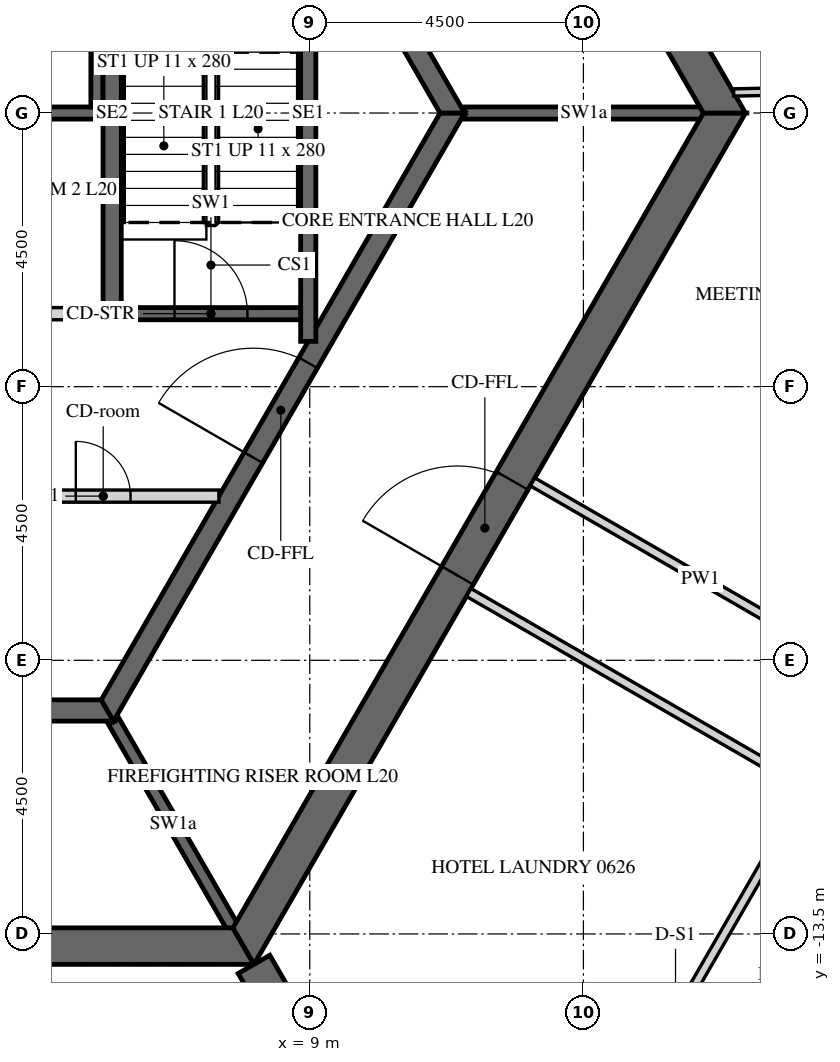
"""IFC4 building model, lengths in metres.
Left out: names, types, materials, properties, quantities, classifications, styles, units other than length and angle.
Written with IfcOpenShell. Run it as: python <this file> out.ifc"""

import sys

from ifc_helpers import new_model, si_unit, direction, frame, frame_2d, origin, place, context, subcontext, project, spatial, polyline, rectangle, outline, extrude, element, fill, save


model = new_model("IFC4")
c1 = context("Model", 3, precision=1e-05, world=origin(), true_north=direction((0.0, 1.0)))
c2 = subcontext(c1, "Body", "Model", "MODEL_VIEW")
j1 = project(units=[si_unit("LENGTHUNIT", "METRE"), si_unit("PLANEANGLEUNIT", "RADIAN")], contexts=[c1])
p1 = place(None, origin())
s1 = spatial("IfcSite", under=j1, at=p1, CompositionType="ELEMENT")
p2 = place(p1, origin())
s2 = spatial("IfcBuilding", under=s1, at=p2, CompositionType="ELEMENT")
p3 = place(p2, frame((0.0, 0.0, 92.1)))
s3 = spatial("IfcBuildingStorey", under=s2, at=p3, CompositionType="ELEMENT", Elevation=92.1)
p4 = place(p3, frame((-7.91, -13.7, -0.15), z_axis=(0.0, 0.0, 1.0), x_axis=(1.0, 0.0, 0.0)))
e1 = element("IfcWall", 1, at=p4, inside=s3, PredefinedType="SHEAR", context=c2, shape_type="SweptSolid", body=[
    extrude(outline(polyline([(-0.173, -0.3), (15.993, -0.3), (15.646, 0.3), (0.173, 0.3), (-0.173, -0.3)])), origin(), (0.0, 0.0, 1.0), 3.9),
])
p5 = place(p4, frame((7.31, 0.0, 0.15)))
e2 = element("IfcOpeningElement", 2, at=p5, cuts=e1, PredefinedType="OPENING", context=c2, shape_type="SweptSolid", body=[
    extrude(rectangle(XDim=1.2, YDim=2.4, at=frame_2d((0.6, 1.2))), frame((0.0, 0.31, 0.0), z_axis=(0.0, -1.0, 0.0), x_axis=(1.0, 0.0, 0.0)), (0.0, 0.0, 1.0), 0.62),
])
p6 = place(p3, frame((7.91, -13.7, -0.15), z_axis=(0.0, 0.0, 1.0), x_axis=(0.499999880136, 0.866025472988, 0.0)))
e3 = element("IfcWall", 3, at=p6, inside=s3, PredefinedType="SHEAR", context=c2, shape_type="SweptSolid", body=[
    extrude(outline(polyline([(-0.173, -0.3), (15.993, -0.3), (15.646, 0.3), (0.173, 0.3), (-0.173, -0.3)])), origin(), (0.0, 0.0, 1.0), 3.9),
])
p7 = place(p6, frame((7.039, 0.0, 0.15)))
e4 = element("IfcOpeningElement", 4, at=p7, cuts=e3, PredefinedType="OPENING", context=c2, shape_type="SweptSolid", body=[
    extrude(rectangle(XDim=1.8, YDim=2.4, at=frame_2d((0.9, 1.2))), frame((0.0, 0.31, 0.0), z_axis=(0.0, -1.0, 0.0), x_axis=(1.0, 0.0, 0.0)), (0.0, 0.0, 1.0), 0.62),
])
p8 = place(p3, frame((15.819, 0.0, -0.15), z_axis=(0.0, 0.0, 1.0), x_axis=(-0.499999880136, 0.866025472988, 0.0)))
e5 = element("IfcWall", 5, at=p8, inside=s3, PredefinedType="SHEAR", context=c2, shape_type="SweptSolid", body=[
    extrude(outline(polyline([(-0.173, -0.3), (15.993, -0.3), (15.646, 0.3), (0.173, 0.3), (-0.173, -0.3)])), origin(), (0.0, 0.0, 1.0), 3.9),
])
p9 = place(p8, frame((6.981, 0.0, 0.15)))
e6 = element("IfcOpeningElement", 6, at=p9, cuts=e5, PredefinedType="OPENING", context=c2, shape_type="SweptSolid", body=[
    extrude(rectangle(XDim=1.8, YDim=2.4, at=frame_2d((0.9, 1.2))), frame((0.0, 0.31, 0.0), z_axis=(0.0, -1.0, 0.0), x_axis=(1.0, 0.0, 0.0)), (0.0, 0.0, 1.0), 0.62),
])
p10 = place(p3, frame((8.083, -14.0, -0.15), z_axis=(0.0, 0.0, 1.0), x_axis=(0.499997680643, -0.866026742862, 0.0)))
e7 = element("IfcWall", 7, at=p10, inside=s3, PredefinedType="SHEAR", context=c2, shape_type="SweptSolid", body=[
    extrude(rectangle(XDim=16.509, YDim=0.6, at=frame_2d((8.254, 0.0))), origin(), (0.0, 0.0, 1.0), 3.9),
])
p11 = place(p10, frame((7.354, 0.0, 0.15)))
e8 = element("IfcOpeningElement", 8, at=p11, cuts=e7, PredefinedType="OPENING", context=c2, shape_type="SweptSolid", body=[
    extrude(rectangle(XDim=1.8, YDim=2.4, at=frame_2d((0.9, 1.2))), frame((0.0, 0.31, 0.0), z_axis=(0.0, -1.0, 0.0), x_axis=(1.0, 0.0, 0.0)), (0.0, 0.0, 1.0), 0.62),
])
p12 = place(p3, frame((-5.673, -9.825, -0.15), z_axis=(0.0, 0.0, 1.0), x_axis=(1.0, 0.0, 0.0)))
e9 = element("IfcWall", 9, at=p12, inside=s3, PredefinedType="SHEAR", context=c2, shape_type="SweptSolid", body=[
    extrude(outline(polyline([(-0.101, -0.175), (11.446, -0.175), (11.244, 0.175), (0.101, 0.175), (-0.101, -0.175)])), origin(), (0.0, 0.0, 1.0), 3.9),
])
p13 = place(p3, frame((5.673, -9.825, -0.15), z_axis=(0.0, 0.0, 1.0), x_axis=(0.499995046907, 0.866028263435, 0.0)))
e10 = element("IfcWall", 10, at=p13, inside=s3, PredefinedType="SHEAR", context=c2, shape_type="SweptSolid", body=[
    extrude(outline(polyline([(-0.101, -0.175), (11.446, -0.175), (11.244, 0.175), (0.101, 0.175), (-0.101, -0.175)])), origin(), (0.0, 0.0, 1.0), 3.9),
])
p14 = place(p13, frame((4.801, 0.0, 0.15)))
e11 = element("IfcOpeningElement", 11, at=p14, cuts=e10, PredefinedType="OPENING", context=c2, shape_type="SweptSolid", body=[
    extrude(rectangle(XDim=1.8, YDim=2.4, at=frame_2d((0.9, 1.2))), frame((0.0, 0.185, 0.0), z_axis=(0.0, -1.0, 0.0), x_axis=(1.0, 0.0, 0.0)), (0.0, 0.0, 1.0), 0.37),
])
p15 = place(p3, frame((11.345, 0.0, -0.15), z_axis=(0.0, 0.0, 1.0), x_axis=(-0.499995046907, 0.866028263435, 0.0)))
e12 = element("IfcWall", 12, at=p15, inside=s3, PredefinedType="SHEAR", context=c2, shape_type="SweptSolid", body=[
    extrude(outline(polyline([(-0.101, -0.175), (11.446, -0.175), (11.244, 0.175), (0.101, 0.175), (-0.101, -0.175)])), origin(), (0.0, 0.0, 1.0), 3.9),
])
p16 = place(p15, frame((4.744, 0.0, 0.15)))
e13 = element("IfcOpeningElement", 13, at=p16, cuts=e12, PredefinedType="OPENING", context=c2, shape_type="SweptSolid", body=[
    extrude(rectangle(XDim=1.8, YDim=2.4, at=frame_2d((0.9, 1.2))), frame((0.0, 0.185, 0.0), z_axis=(0.0, -1.0, 0.0), x_axis=(1.0, 0.0, 0.0)), (0.0, 0.0, 1.0), 0.37),
])
p17 = place(p3, frame((-5.6, 0.0, -0.25), z_axis=(0.0, 0.0, 1.0), x_axis=(1.0, 0.0, 0.0)))
e14 = element("IfcWall", 14, at=p17, inside=s3, PredefinedType="SHEAR", context=c2, shape_type="SweptSolid", body=[
    extrude(rectangle(XDim=11.2, YDim=0.2, at=frame_2d((5.6, 0.0))), origin(), (0.0, 0.0, 1.0), 3.9),
])
p18 = place(p3, frame((5.5, 0.1, -0.25), z_axis=(0.0, 0.0, 1.0), x_axis=(0.0, 1.0, 0.0)))
e15 = element("IfcWall", 15, at=p18, inside=s3, PredefinedType="SHEAR", context=c2, shape_type="SweptSolid", body=[
    extrude(rectangle(XDim=3.1, YDim=0.2, at=frame_2d((1.55, 0.0))), origin(), (0.0, 0.0, 1.0), 3.9),
])
p19 = place(p3, frame((0.1, -3.3, 0.0), z_axis=(0.0, 0.0, 1.0), x_axis=(1.0, 0.0, 0.0)))
e16 = element("IfcWall", 16, at=p19, inside=s3, PredefinedType="PARTITIONING", context=c2, shape_type="SweptSolid", body=[
    extrude(rectangle(XDim=5.5, YDim=0.2, at=frame_2d((2.75, 0.0))), origin(), (0.0, 0.0, 1.0), 3.65),
])
p20 = place(p19, frame((2.3, 0.0, 0.0)))
e17 = element("IfcOpeningElement", 17, at=p20, cuts=e16, PredefinedType="OPENING", context=c2, shape_type="SweptSolid", body=[
    extrude(rectangle(XDim=0.9, YDim=2.1, at=frame_2d((0.45, 1.05))), frame((0.0, 0.11, 0.0), z_axis=(0.0, -1.0, 0.0), x_axis=(1.0, 0.0, 0.0)), (0.0, 0.0, 1.0), 0.22),
])
p21 = place(p3, frame((3.7, -6.3, 0.0), z_axis=(0.0, 0.0, 1.0), x_axis=(1.0, 0.0, 0.0)))
e18 = element("IfcWall", 18, at=p21, inside=s3, PredefinedType="PARTITIONING", context=c2, shape_type="SweptSolid", body=[
    extrude(rectangle(XDim=3.806, YDim=0.2, at=frame_2d((1.903, 0.0))), origin(), (0.0, 0.0, 1.0), 3.65),
])
p22 = place(p21, frame((1.453, 0.0, 0.0)))
e19 = element("IfcOpeningElement", 19, at=p22, cuts=e18, PredefinedType="OPENING", context=c2, shape_type="SweptSolid", body=[
    extrude(rectangle(XDim=0.9, YDim=2.1, at=frame_2d((0.45, 1.05))), frame((0.0, 0.11, 0.0), z_axis=(0.0, -1.0, 0.0), x_axis=(1.0, 0.0, 0.0)), (0.0, 0.0, 1.0), 0.22),
])
p23 = place(p3, frame((11.547, 0.0, -0.15), z_axis=(0.0, 0.0, 1.0), x_axis=(1.0, 0.0, 0.0)))
e20 = element("IfcWall", 20, at=p23, inside=s3, PredefinedType="SHEAR", context=c2, shape_type="SweptSolid", body=[
    extrude(rectangle(XDim=3.926, YDim=0.2, at=frame_2d((1.963, 0.0))), origin(), (0.0, 0.0, 1.0), 3.9),
])
p24 = place(p3, frame((5.773, -10.0, -0.15), z_axis=(0.0, 0.0, 1.0), x_axis=(0.500038251005, -0.86600331843, 0.0)))
e21 = element("IfcWall", 21, at=p24, inside=s3, PredefinedType="SHEAR", context=c2, shape_type="SweptSolid", body=[
    extrude(rectangle(XDim=3.926, YDim=0.2, at=frame_2d((1.963, 0.0))), origin(), (0.0, 0.0, 1.0), 3.9),
])
p25 = place(p3, frame((5.75, -3.4, -0.25), z_axis=(0.0, 0.0, 1.0), x_axis=(0.0, 1.0, 0.0)))
e22 = element("IfcWall", 22, at=p25, inside=s3, PredefinedType="SHEAR", context=c2, shape_type="SweptSolid", body=[
    extrude(rectangle(XDim=6.8, YDim=0.3, at=frame_2d((3.4, 0.0))), origin(), (0.0, 0.0, 1.0), 3.9),
])
p26 = place(p3, frame((8.975, -3.755, -0.25), z_axis=(0.0, 0.0, 1.0), x_axis=(0.0, 1.0, 0.0)))
e23 = element("IfcWall", 23, at=p26, inside=s3, PredefinedType="SHEAR", context=c2, shape_type="SweptSolid", body=[
    extrude(rectangle(XDim=7.51, YDim=0.25, at=frame_2d((3.755, 0.0))), origin(), (0.0, 0.0, 1.0), 3.9),
])
p27 = place(p3, frame((5.9, -3.3, -0.25), z_axis=(0.0, 0.0, 1.0), x_axis=(1.0, 0.0, 0.0)))
e24 = element("IfcWall", 24, at=p27, inside=s3, PredefinedType="SHEAR", context=c2, shape_type="SweptSolid", body=[
    extrude(rectangle(XDim=2.95, YDim=0.2, at=frame_2d((1.475, 0.0))), origin(), (0.0, 0.0, 1.0), 3.9),
])
p28 = place(p27, frame((0.875, 0.0, 0.25)))
e25 = element("IfcOpeningElement", 25, at=p28, cuts=e24, PredefinedType="OPENING", context=c2, shape_type="SweptSolid", body=[
    extrude(rectangle(XDim=1.2, YDim=2.4, at=frame_2d((0.6, 1.2))), frame((0.0, 0.11, 0.0), z_axis=(0.0, -1.0, 0.0), x_axis=(1.0, 0.0, 0.0)), (0.0, 0.0, 1.0), 0.22),
])
p29 = place(p3, frame((14.102, -20.075, 0.0), z_axis=(0.0, 0.0, 1.0), x_axis=(0.499996816197, 0.866027241946, 0.0)))
e26 = element("IfcWall", 26, at=p29, inside=s3, PredefinedType="PARTITIONING", context=c2, shape_type="SweptSolid", body=[
    extrude(rectangle(XDim=24.238, YDim=0.15, at=frame_2d((12.119, 0.0))), origin(), (0.0, 0.0, 1.0), 2.988),
])
p30 = place(p29, frame((4.729, 0.0, 0.0)))
e27 = element("IfcOpeningElement", 27, at=p30, cuts=e26, PredefinedType="OPENING", context=c2, shape_type="SweptSolid", body=[
    extrude(rectangle(XDim=1.0, YDim=2.1, at=frame_2d((0.5, 1.05))), frame((0.0, 0.085, 0.0), z_axis=(0.0, -1.0, 0.0), x_axis=(1.0, 0.0, 0.0)), (0.0, 0.0, 1.0), 0.17),
])
p31 = place(p29, frame((13.446, 0.0, 0.0)))
e28 = element("IfcOpeningElement", 28, at=p31, cuts=e26, PredefinedType="OPENING", context=c2, shape_type="SweptSolid", body=[
    extrude(rectangle(XDim=1.0, YDim=2.1, at=frame_2d((0.5, 1.05))), frame((0.0, 0.085, 0.0), z_axis=(0.0, -1.0, 0.0), x_axis=(1.0, 0.0, 0.0)), (0.0, 0.0, 1.0), 0.17),
])
p32 = place(p3, frame((26.174, 0.985, 0.0), z_axis=(0.0, 0.0, 1.0), x_axis=(-0.559199676409, 0.82903300411, 0.0)))
e29 = element("IfcWall", 29, at=p32, inside=s3, PredefinedType="PARTITIONING", context=c2, shape_type="SweptSolid", body=[
    extrude(rectangle(XDim=22.335, YDim=0.15, at=frame_2d((11.168, 0.0))), origin(), (0.0, 0.0, 1.0), 2.988),
])
p33 = place(p32, frame((0.863, 0.0, 0.0)))
e30 = element("IfcOpeningElement", 30, at=p33, cuts=e29, PredefinedType="OPENING", context=c2, shape_type="SweptSolid", body=[
    extrude(rectangle(XDim=1.0, YDim=2.1, at=frame_2d((0.5, 1.05))), frame((0.0, 0.085, 0.0), z_axis=(0.0, -1.0, 0.0), x_axis=(1.0, 0.0, 0.0)), (0.0, 0.0, 1.0), 0.17),
])
p34 = place(p32, frame((10.909, 0.0, 0.0)))
e31 = element("IfcOpeningElement", 31, at=p34, cuts=e29, PredefinedType="OPENING", context=c2, shape_type="SweptSolid", body=[
    extrude(rectangle(XDim=1.0, YDim=2.1, at=frame_2d((0.5, 1.05))), frame((0.0, 0.085, 0.0), z_axis=(0.0, -1.0, 0.0), x_axis=(1.0, 0.0, 0.0)), (0.0, 0.0, 1.0), 0.17),
])
p35 = place(p3, frame((18.185, -9.253, 0.0), z_axis=(0.0, 0.0, 1.0), x_axis=(-0.866028703517, 0.499994284652, 0.0)))
e32 = element("IfcWall", 32, at=p35, inside=s3, PredefinedType="PARTITIONING", context=c2, shape_type="SweptSolid", body=[
    extrude(rectangle(XDim=6.375, YDim=0.15, at=frame_2d((3.188, 0.0))), origin(), (0.0, 0.0, 1.0), 2.988),
])
p36 = place(p3, frame((11.614, -7.884, 0.0), z_axis=(0.0, 0.0, 1.0), x_axis=(0.866021702275, -0.500006411147, 0.0)))
e33 = element("IfcWall", 33, at=p36, inside=s3, PredefinedType="PARTITIONING", context=c2, shape_type="SweptSolid", body=[
    extrude(rectangle(XDim=6.45, YDim=0.15, at=frame_2d((3.225, 0.0))), origin(), (0.0, 0.0, 1.0), 2.988),
])
p37 = place(p3, frame((17.162, -11.174, 0.0), z_axis=(0.0, 0.0, 1.0), x_axis=(-0.499997214665, -0.866027011893, 0.0)))
e34 = element("IfcWall", 34, at=p37, inside=s3, PredefinedType="PARTITIONING", context=c2, shape_type="SweptSolid", body=[
    extrude(rectangle(XDim=8.589, YDim=0.15, at=frame_2d((4.294, 0.0))), origin(), (0.0, 0.0, 1.0), 2.988),
])
p38 = place(p37, frame((3.844, 0.0, 0.0)))
e35 = element("IfcOpeningElement", 35, at=p38, cuts=e34, PredefinedType="OPENING", context=c2, shape_type="SweptSolid", body=[
    extrude(rectangle(XDim=0.9, YDim=2.1, at=frame_2d((0.45, 1.05))), frame((0.0, 0.085, 0.0), z_axis=(0.0, -1.0, 0.0), x_axis=(1.0, 0.0, 0.0)), (0.0, 0.0, 1.0), 0.17),
])
p39 = place(p3, frame((23.818, 0.504, 0.0), z_axis=(0.0, 0.0, 1.0), x_axis=(-0.999776284395, -0.021151386765, 0.0)))
e36 = element("IfcWall", 36, at=p39, inside=s3, PredefinedType="PARTITIONING", context=c2, shape_type="SweptSolid", body=[
    extrude(rectangle(XDim=7.849, YDim=0.12, at=frame_2d((3.924, 0.0))), origin(), (0.0, 0.0, 1.0), 2.988),
])
p40 = place(p7, origin())
e37 = element("IfcDoor", 37, at=p40, inside=s3, OperationType="DOUBLE_DOOR_SINGLE_SWING", PredefinedType="DOOR", context=c2, shape_type="SweptSolid", body=[
    extrude(rectangle(XDim=1.8, YDim=2.4, at=frame_2d((0.9, 1.2))), frame((0.0, 0.025, 0.0), z_axis=(0.0, -1.0, 0.0), x_axis=(1.0, 0.0, 0.0)), (0.0, 0.0, 1.0), 0.05),
])
fill(e4, e37)
p41 = place(p14, origin())
e38 = element("IfcDoor", 38, at=p41, inside=s3, OperationType="DOUBLE_DOOR_SINGLE_SWING", PredefinedType="DOOR", context=c2, shape_type="SweptSolid", body=[
    extrude(rectangle(XDim=1.8, YDim=2.4, at=frame_2d((0.9, 1.2))), frame((0.0, 0.025, 0.0), z_axis=(0.0, -1.0, 0.0), x_axis=(1.0, 0.0, 0.0)), (0.0, 0.0, 1.0), 0.05),
])
fill(e11, e38)
p42 = place(p22, origin())
e39 = element("IfcDoor", 39, at=p42, inside=s3, OperationType="SINGLE_SWING_LEFT", PredefinedType="DOOR", context=c2, shape_type="SweptSolid", body=[
    extrude(rectangle(XDim=0.9, YDim=2.1, at=frame_2d((0.45, 1.05))), frame((0.0, 0.025, 0.0), z_axis=(0.0, -1.0, 0.0), x_axis=(1.0, 0.0, 0.0)), (0.0, 0.0, 1.0), 0.05),
])
fill(e19, e39)
p43 = place(p28, origin())
e40 = element("IfcDoor", 40, at=p43, inside=s3, OperationType="SINGLE_SWING_LEFT", PredefinedType="DOOR", context=c2, shape_type="SweptSolid", body=[
    extrude(rectangle(XDim=1.2, YDim=2.4, at=frame_2d((0.6, 1.2))), frame((0.0, 0.025, 0.0), z_axis=(0.0, -1.0, 0.0), x_axis=(1.0, 0.0, 0.0)), (0.0, 0.0, 1.0), 0.05),
])
fill(e25, e40)
save(model, sys.argv[1])
